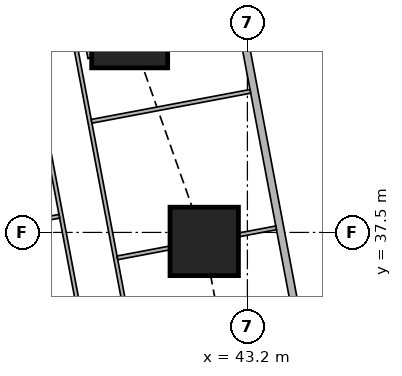
"""IFC4 building model, lengths in metres.
Left out: names, types, materials, properties, quantities, classifications, styles, units other than length and angle.
Written with IfcOpenShell. Run it as: python <this file> out.ifc"""

import sys

from ifc_helpers import new_model, si_unit, direction, frame, frame_2d, origin, origin_2d, place, context, subcontext, project, spatial, rectangle, extrude, element, fill, save


model = new_model("IFC4")
c1 = context("Model", 3, precision=1e-05, world=origin(), true_north=direction((0.0, 1.0)))
c2 = subcontext(c1, "Body", "Model", "MODEL_VIEW")
j1 = project(units=[si_unit("LENGTHUNIT", "METRE"), si_unit("PLANEANGLEUNIT", "RADIAN")], contexts=[c1])
p1 = place(None, origin())
s1 = spatial("IfcSite", under=j1, at=p1, CompositionType="ELEMENT")
p2 = place(p1, origin())
s2 = spatial("IfcBuilding", under=s1, at=p2, CompositionType="ELEMENT")
p3 = place(p2, frame((0.0, 0.0, 139.55)))
s3 = spatial("IfcBuildingStorey", under=s2, at=p3, CompositionType="ELEMENT", Elevation=139.55)
p4 = place(p3, frame((42.064, 37.263, 0.0), z_axis=(0.0, 0.0, 1.0), x_axis=(1.0, 0.0, 0.0)))
e1 = element("IfcColumn", 1, at=p4, inside=s3, PredefinedType="COLUMN", context=c2, shape_type="SweptSolid", body=[
    extrude(rectangle(XDim=1.8, YDim=1.8, at=origin_2d()), origin(), (0.0, 0.0, 1.0), 3.75),
])
p5 = place(p3, frame((40.102, 42.83, 0.0), z_axis=(0.0, 0.0, 1.0), x_axis=(1.0, 0.0, 0.0)))
e2 = element("IfcColumn", 2, at=p5, inside=s3, PredefinedType="COLUMN", context=c2, shape_type="SweptSolid", body=[
    extrude(rectangle(XDim=2.0, YDim=2.0, at=origin_2d()), origin(), (0.0, 0.0, 1.0), 3.75),
])
p6 = place(p3, frame((50.653, 2.703, 0.0), z_axis=(0.0, 0.0, 1.0), x_axis=(-0.185612026696, 0.982623109613, 0.0)))
e3 = element("IfcWall", 3, at=p6, inside=s3, PredefinedType="SOLIDWALL", context=c2, shape_type="SweptSolid", body=[
    extrude(rectangle(XDim=41.393, YDim=0.2, at=frame_2d((20.697, 0.0))), origin(), (0.0, 0.0, 1.0), 3.5),
])
p7 = place(p6, frame((1.633, 0.0, 0.9)))
e4 = element("IfcOpeningElement", 4, at=p7, cuts=e3, PredefinedType="OPENING", context=c2, shape_type="SweptSolid", body=[
    extrude(rectangle(XDim=1.8, YDim=1.5, at=frame_2d((0.9, 0.75))), frame((0.0, 0.11, 0.0), z_axis=(0.0, -1.0, 0.0), x_axis=(1.0, 0.0, 0.0)), (0.0, 0.0, 1.0), 0.22),
])
p8 = place(p6, frame((6.032, 0.0, 0.9)))
e5 = element("IfcOpeningElement", 5, at=p8, cuts=e3, PredefinedType="OPENING", context=c2, shape_type="SweptSolid", body=[
    extrude(rectangle(XDim=1.8, YDim=1.5, at=frame_2d((0.9, 0.75))), frame((0.0, 0.11, 0.0), z_axis=(0.0, -1.0, 0.0), x_axis=(1.0, 0.0, 0.0)), (0.0, 0.0, 1.0), 0.22),
])
p9 = place(p6, frame((9.848, 0.0, 0.9)))
e6 = element("IfcOpeningElement", 6, at=p9, cuts=e3, PredefinedType="OPENING", context=c2, shape_type="SweptSolid", body=[
    extrude(rectangle(XDim=1.8, YDim=1.5, at=frame_2d((0.9, 0.75))), frame((0.0, 0.11, 0.0), z_axis=(0.0, -1.0, 0.0), x_axis=(1.0, 0.0, 0.0)), (0.0, 0.0, 1.0), 0.22),
])
p10 = place(p6, frame((13.664, 0.0, 0.9)))
e7 = element("IfcOpeningElement", 7, at=p10, cuts=e3, PredefinedType="OPENING", context=c2, shape_type="SweptSolid", body=[
    extrude(rectangle(XDim=1.8, YDim=1.5, at=frame_2d((0.9, 0.75))), frame((0.0, 0.11, 0.0), z_axis=(0.0, -1.0, 0.0), x_axis=(1.0, 0.0, 0.0)), (0.0, 0.0, 1.0), 0.22),
])
p11 = place(p6, frame((17.481, 0.0, 0.9)))
e8 = element("IfcOpeningElement", 8, at=p11, cuts=e3, PredefinedType="OPENING", context=c2, shape_type="SweptSolid", body=[
    extrude(rectangle(XDim=1.8, YDim=1.5, at=frame_2d((0.9, 0.75))), frame((0.0, 0.11, 0.0), z_axis=(0.0, -1.0, 0.0), x_axis=(1.0, 0.0, 0.0)), (0.0, 0.0, 1.0), 0.22),
])
p12 = place(p6, frame((21.297, 0.0, 0.9)))
e9 = element("IfcOpeningElement", 9, at=p12, cuts=e3, PredefinedType="OPENING", context=c2, shape_type="SweptSolid", body=[
    extrude(rectangle(XDim=1.8, YDim=1.5, at=frame_2d((0.9, 0.75))), frame((0.0, 0.11, 0.0), z_axis=(0.0, -1.0, 0.0), x_axis=(1.0, 0.0, 0.0)), (0.0, 0.0, 1.0), 0.22),
])
p13 = place(p6, frame((25.113, 0.0, 0.9)))
e10 = element("IfcOpeningElement", 10, at=p13, cuts=e3, PredefinedType="OPENING", context=c2, shape_type="SweptSolid", body=[
    extrude(rectangle(XDim=1.8, YDim=1.5, at=frame_2d((0.9, 0.75))), frame((0.0, 0.11, 0.0), z_axis=(0.0, -1.0, 0.0), x_axis=(1.0, 0.0, 0.0)), (0.0, 0.0, 1.0), 0.22),
])
p14 = place(p6, frame((28.93, 0.0, 0.9)))
e11 = element("IfcOpeningElement", 11, at=p14, cuts=e3, PredefinedType="OPENING", context=c2, shape_type="SweptSolid", body=[
    extrude(rectangle(XDim=1.8, YDim=1.5, at=frame_2d((0.9, 0.75))), frame((0.0, 0.11, 0.0), z_axis=(0.0, -1.0, 0.0), x_axis=(1.0, 0.0, 0.0)), (0.0, 0.0, 1.0), 0.22),
])
p15 = place(p6, frame((32.746, 0.0, 0.9)))
e12 = element("IfcOpeningElement", 12, at=p15, cuts=e3, PredefinedType="OPENING", context=c2, shape_type="SweptSolid", body=[
    extrude(rectangle(XDim=1.8, YDim=1.5, at=frame_2d((0.9, 0.75))), frame((0.0, 0.11, 0.0), z_axis=(0.0, -1.0, 0.0), x_axis=(1.0, 0.0, 0.0)), (0.0, 0.0, 1.0), 0.22),
])
p16 = place(p6, frame((36.481, 0.0, 0.9)))
e13 = element("IfcOpeningElement", 13, at=p16, cuts=e3, PredefinedType="OPENING", context=c2, shape_type="SweptSolid", body=[
    extrude(rectangle(XDim=1.8, YDim=1.5, at=frame_2d((0.9, 0.75))), frame((0.0, 0.11, 0.0), z_axis=(0.0, -1.0, 0.0), x_axis=(1.0, 0.0, 0.0)), (0.0, 0.0, 1.0), 0.22),
])
p17 = place(p3, frame((33.623, 43.022, 0.0), z_axis=(0.0, 0.0, 1.0), x_axis=(0.185596841028, -0.98262597798, 0.0)))
e14 = element("IfcWall", 14, at=p17, inside=s3, PredefinedType="SOLIDWALL", context=c2, shape_type="SweptSolid", body=[
    extrude(rectangle(XDim=41.66, YDim=0.15, at=frame_2d((20.83, 0.0))), origin(), (0.0, 0.0, 1.0), 2.5),
])
p18 = place(p17, frame((20.242, 0.0, 0.0)))
e15 = element("IfcOpeningElement", 15, at=p18, cuts=e14, PredefinedType="OPENING", context=c2, shape_type="SweptSolid", body=[
    extrude(rectangle(XDim=1.0, YDim=2.1, at=frame_2d((0.5, 1.05))), frame((0.0, 0.085, 0.0), z_axis=(0.0, -1.0, 0.0), x_axis=(1.0, 0.0, 0.0)), (0.0, 0.0, 1.0), 0.17),
])
p19 = place(p17, frame((24.714, 0.0, 0.0)))
e16 = element("IfcOpeningElement", 16, at=p19, cuts=e14, PredefinedType="OPENING", context=c2, shape_type="SweptSolid", body=[
    extrude(rectangle(XDim=1.0, YDim=2.1, at=frame_2d((0.5, 1.05))), frame((0.0, 0.085, 0.0), z_axis=(0.0, -1.0, 0.0), x_axis=(1.0, 0.0, 0.0)), (0.0, 0.0, 1.0), 0.17),
])
p20 = place(p17, frame((31.206, 0.0, 0.0)))
e17 = element("IfcOpeningElement", 17, at=p20, cuts=e14, PredefinedType="OPENING", context=c2, shape_type="SweptSolid", body=[
    extrude(rectangle(XDim=1.0, YDim=2.1, at=frame_2d((0.5, 1.05))), frame((0.0, 0.085, 0.0), z_axis=(0.0, -1.0, 0.0), x_axis=(1.0, 0.0, 0.0)), (0.0, 0.0, 1.0), 0.17),
])
p21 = place(p3, frame((39.054, 42.085, 0.0), z_axis=(0.0, 0.0, 1.0), x_axis=(-0.185791584218, 0.982589175207, 0.0)))
e18 = element("IfcWall", 18, at=p21, inside=s3, PredefinedType="PARTITIONING", context=c2, shape_type="SweptSolid", body=[
    extrude(rectangle(XDim=3.628, YDim=0.1, at=frame_2d((1.814, 0.0))), origin(), (0.0, 0.0, 1.0), 2.1),
])
p22 = place(p3, frame((38.701, 42.27, 0.0), z_axis=(0.0, 0.0, 1.0), x_axis=(0.185640619081, -0.98261770824, 0.0)))
e19 = element("IfcWall", 19, at=p22, inside=s3, PredefinedType="PARTITIONING", context=c2, shape_type="SweptSolid", body=[
    extrude(rectangle(XDim=17.103, YDim=0.1, at=frame_2d((8.552, 0.0))), origin(), (0.0, 0.0, 1.0), 2.5),
])
p23 = place(p22, frame((16.053, 0.0, 0.0)))
e20 = element("IfcOpeningElement", 20, at=p23, cuts=e19, PredefinedType="OPENING", context=c2, shape_type="SweptSolid", body=[
    extrude(rectangle(XDim=0.9, YDim=2.1, at=frame_2d((0.45, 1.05))), frame((0.0, 0.06, 0.0), z_axis=(0.0, -1.0, 0.0), x_axis=(1.0, 0.0, 0.0)), (0.0, 0.0, 1.0), 0.12),
])
p24 = place(p22, frame((12.077, 0.0, 0.0)))
e21 = element("IfcOpeningElement", 21, at=p24, cuts=e19, PredefinedType="OPENING", context=c2, shape_type="SweptSolid", body=[
    extrude(rectangle(XDim=0.9, YDim=2.1, at=frame_2d((0.45, 1.05))), frame((0.0, 0.06, 0.0), z_axis=(0.0, -1.0, 0.0), x_axis=(1.0, 0.0, 0.0)), (0.0, 0.0, 1.0), 0.12),
])
p25 = place(p22, frame((8.42, 0.0, 0.0)))
e22 = element("IfcOpeningElement", 22, at=p25, cuts=e19, PredefinedType="OPENING", context=c2, shape_type="SweptSolid", body=[
    extrude(rectangle(XDim=0.9, YDim=2.1, at=frame_2d((0.45, 1.05))), frame((0.0, 0.06, 0.0), z_axis=(0.0, -1.0, 0.0), x_axis=(1.0, 0.0, 0.0)), (0.0, 0.0, 1.0), 0.12),
])
p26 = place(p22, frame((4.444, 0.0, 0.0)))
e23 = element("IfcOpeningElement", 23, at=p26, cuts=e19, PredefinedType="OPENING", context=c2, shape_type="SweptSolid", body=[
    extrude(rectangle(XDim=0.9, YDim=2.1, at=frame_2d((0.45, 1.05))), frame((0.0, 0.06, 0.0), z_axis=(0.0, -1.0, 0.0), x_axis=(1.0, 0.0, 0.0)), (0.0, 0.0, 1.0), 0.12),
])
p27 = place(p3, frame((37.411, 42.638, 0.0), z_axis=(0.0, 0.0, 1.0), x_axis=(0.185555586706, -0.982633769134, 0.0)))
e24 = element("IfcWall", 24, at=p27, inside=s3, PredefinedType="PARTITIONING", context=c2, shape_type="SweptSolid", body=[
    extrude(rectangle(XDim=17.704, YDim=0.1, at=frame_2d((8.852, 0.0))), origin(), (0.0, 0.0, 1.0), 2.5),
])
p28 = place(p27, frame((16.28, 0.0, 0.0)))
e25 = element("IfcOpeningElement", 25, at=p28, cuts=e24, PredefinedType="OPENING", context=c2, shape_type="SweptSolid", body=[
    extrude(rectangle(XDim=0.9, YDim=2.1, at=frame_2d((0.45, 1.05))), frame((0.0, 0.06, 0.0), z_axis=(0.0, -1.0, 0.0), x_axis=(1.0, 0.0, 0.0)), (0.0, 0.0, 1.0), 0.12),
])
p29 = place(p27, frame((12.688, 0.0, 0.0)))
e26 = element("IfcOpeningElement", 26, at=p29, cuts=e24, PredefinedType="OPENING", context=c2, shape_type="SweptSolid", body=[
    extrude(rectangle(XDim=0.9, YDim=2.1, at=frame_2d((0.45, 1.05))), frame((0.0, 0.06, 0.0), z_axis=(0.0, -1.0, 0.0), x_axis=(1.0, 0.0, 0.0)), (0.0, 0.0, 1.0), 0.12),
])
p30 = place(p27, frame((8.822, 0.0, 0.0)))
e27 = element("IfcOpeningElement", 27, at=p30, cuts=e24, PredefinedType="OPENING", context=c2, shape_type="SweptSolid", body=[
    extrude(rectangle(XDim=0.9, YDim=2.1, at=frame_2d((0.45, 1.05))), frame((0.0, 0.06, 0.0), z_axis=(0.0, -1.0, 0.0), x_axis=(1.0, 0.0, 0.0)), (0.0, 0.0, 1.0), 0.12),
])
p31 = place(p27, frame((3.188, 0.0, 0.0)))
e28 = element("IfcOpeningElement", 28, at=p31, cuts=e24, PredefinedType="OPENING", context=c2, shape_type="SweptSolid", body=[
    extrude(rectangle(XDim=0.9, YDim=2.1, at=frame_2d((0.45, 1.05))), frame((0.0, 0.06, 0.0), z_axis=(0.0, -1.0, 0.0), x_axis=(1.0, 0.0, 0.0)), (0.0, 0.0, 1.0), 0.12),
])
p32 = place(p27, frame((0.15, 0.0, 0.0)))
e29 = element("IfcOpeningElement", 29, at=p32, cuts=e24, PredefinedType="OPENING", context=c2, shape_type="SweptSolid", body=[
    extrude(rectangle(XDim=0.9, YDim=2.1, at=frame_2d((0.45, 1.05))), frame((0.0, 0.06, 0.0), z_axis=(0.0, -1.0, 0.0), x_axis=(1.0, 0.0, 0.0)), (0.0, 0.0, 1.0), 0.12),
])
p33 = place(p27, frame((14.371, 0.0, 0.0)))
e30 = element("IfcOpeningElement", 30, at=p33, cuts=e24, PredefinedType="OPENING", context=c2, shape_type="SweptSolid", body=[
    extrude(rectangle(XDim=0.9, YDim=2.1, at=frame_2d((0.45, 1.05))), frame((0.0, 0.06, 0.0), z_axis=(0.0, -1.0, 0.0), x_axis=(1.0, 0.0, 0.0)), (0.0, 0.0, 1.0), 0.12),
])
p34 = place(p27, frame((10.78, 0.0, 0.0)))
e31 = element("IfcOpeningElement", 31, at=p34, cuts=e24, PredefinedType="OPENING", context=c2, shape_type="SweptSolid", body=[
    extrude(rectangle(XDim=0.9, YDim=2.1, at=frame_2d((0.45, 1.05))), frame((0.0, 0.06, 0.0), z_axis=(0.0, -1.0, 0.0), x_axis=(1.0, 0.0, 0.0)), (0.0, 0.0, 1.0), 0.12),
])
p35 = place(p27, frame((6.154, 0.0, 0.0)))
e32 = element("IfcOpeningElement", 32, at=p35, cuts=e24, PredefinedType="OPENING", context=c2, shape_type="SweptSolid", body=[
    extrude(rectangle(XDim=0.9, YDim=2.1, at=frame_2d((0.45, 1.05))), frame((0.0, 0.06, 0.0), z_axis=(0.0, -1.0, 0.0), x_axis=(1.0, 0.0, 0.0)), (0.0, 0.0, 1.0), 0.12),
])
p36 = place(p3, frame((43.277, 41.212, 0.0), z_axis=(0.0, 0.0, 1.0), x_axis=(-0.982665405803, -0.185387972203, 0.0)))
e33 = element("IfcWall", 33, at=p36, inside=s3, PredefinedType="PARTITIONING", context=c2, shape_type="SweptSolid", body=[
    extrude(rectangle(XDim=4.25, YDim=0.1, at=frame_2d((2.125, 0.0))), origin(), (0.0, 0.0, 1.0), 2.1),
])
p37 = place(p3, frame((43.955, 37.62, 0.0), z_axis=(0.0, 0.0, 1.0), x_axis=(-0.982666697719, -0.185381124159, 0.0)))
e34 = element("IfcWall", 34, at=p37, inside=s3, PredefinedType="PARTITIONING", context=c2, shape_type="SweptSolid", body=[
    extrude(rectangle(XDim=0.998, YDim=0.1, at=frame_2d((0.499, 0.0))), origin(), (0.0, 0.0, 1.0), 3.5),
])
p38 = place(p3, frame((41.154, 37.091, 0.0), z_axis=(0.0, 0.0, 1.0), x_axis=(-0.982562488259, -0.185932667021, 0.0)))
e35 = element("IfcWall", 35, at=p38, inside=s3, PredefinedType="PARTITIONING", context=c2, shape_type="SweptSolid", body=[
    extrude(rectangle(XDim=1.398, YDim=0.1, at=frame_2d((0.699, 0.0))), origin(), (0.0, 0.0, 1.0), 3.5),
])
p39 = place(p3, frame((38.25, 37.925, 0.0), z_axis=(0.0, 0.0, 1.0), x_axis=(-0.982676595259, -0.18532865167, 0.0)))
e36 = element("IfcWall", 36, at=p39, inside=s3, PredefinedType="PARTITIONING", context=c2, shape_type="SweptSolid", body=[
    extrude(rectangle(XDim=1.516, YDim=0.1, at=frame_2d((0.758, 0.0))), origin(), (0.0, 0.0, 1.0), 3.5),
])
p40 = place(p15, origin())
e37 = element("IfcWindow", 37, at=p40, inside=s3, PartitioningType="SINGLE_PANEL", PredefinedType="WINDOW", context=c2, shape_type="SweptSolid", body=[
    extrude(rectangle(XDim=1.8, YDim=1.5, at=frame_2d((0.9, 0.75))), frame((0.0, 0.03, 0.0), z_axis=(0.0, -1.0, 0.0), x_axis=(1.0, 0.0, 0.0)), (0.0, 0.0, 1.0), 0.06),
])
fill(e12, e37)
p41 = place(p16, origin())
e38 = element("IfcWindow", 38, at=p41, inside=s3, PartitioningType="SINGLE_PANEL", PredefinedType="WINDOW", context=c2, shape_type="SweptSolid", body=[
    extrude(rectangle(XDim=1.8, YDim=1.5, at=frame_2d((0.9, 0.75))), frame((0.0, 0.03, 0.0), z_axis=(0.0, -1.0, 0.0), x_axis=(1.0, 0.0, 0.0)), (0.0, 0.0, 1.0), 0.06),
])
fill(e13, e38)
p42 = place(p26, origin())
e39 = element("IfcDoor", 39, at=p42, inside=s3, OperationType="SINGLE_SWING_RIGHT", PredefinedType="DOOR", context=c2, shape_type="SweptSolid", body=[
    extrude(rectangle(XDim=0.9, YDim=2.1, at=frame_2d((0.45, 1.05))), frame((0.0, 0.025, 0.0), z_axis=(0.0, -1.0, 0.0), x_axis=(1.0, 0.0, 0.0)), (0.0, 0.0, 1.0), 0.05),
])
fill(e23, e39)
p43 = place(p31, origin())
e40 = element("IfcDoor", 40, at=p43, inside=s3, OperationType="SINGLE_SWING_RIGHT", PredefinedType="DOOR", context=c2, shape_type="SweptSolid", body=[
    extrude(rectangle(XDim=0.9, YDim=2.1, at=frame_2d((0.45, 1.05))), frame((0.0, 0.025, 0.0), z_axis=(0.0, -1.0, 0.0), x_axis=(1.0, 0.0, 0.0)), (0.0, 0.0, 1.0), 0.05),
])
fill(e28, e40)
p44 = place(p35, origin())
e41 = element("IfcDoor", 41, at=p44, inside=s3, OperationType="SINGLE_SWING_LEFT", PredefinedType="DOOR", context=c2, shape_type="SweptSolid", body=[
    extrude(rectangle(XDim=0.9, YDim=2.1, at=frame_2d((0.45, 1.05))), frame((0.0, 0.025, 0.0), z_axis=(0.0, -1.0, 0.0), x_axis=(1.0, 0.0, 0.0)), (0.0, 0.0, 1.0), 0.05),
])
fill(e32, e41)
save(model, sys.argv[1])
